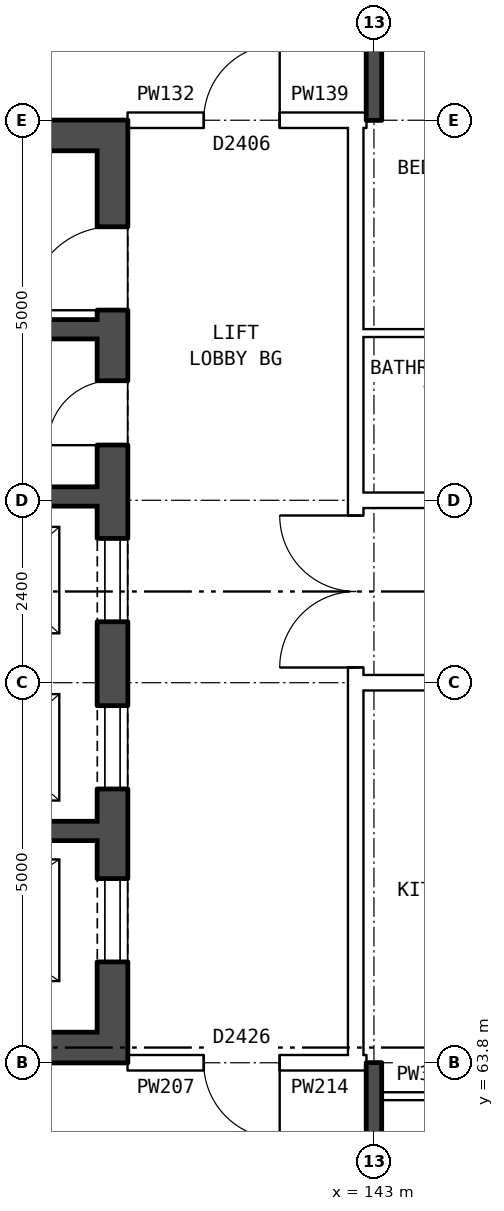
"""IFC4 building model, lengths in metres.
Left out: names, types, materials, properties, quantities, classifications, styles, units other than length and angle.
Written with IfcOpenShell. Run it as: python <this file> out.ifc"""

import sys

from ifc_helpers import new_model, si_unit, direction, frame, frame_2d, origin, place, context, subcontext, project, spatial, rectangle, extrude, element, fill, save


model = new_model("IFC4")
c1 = context("Model", 3, precision=1e-05, world=origin(), true_north=direction((0.0, 1.0)))
c2 = subcontext(c1, "Body", "Model", "MODEL_VIEW")
j1 = project(units=[si_unit("LENGTHUNIT", "METRE"), si_unit("PLANEANGLEUNIT", "RADIAN")], contexts=[c1])
p1 = place(None, origin())
s1 = spatial("IfcSite", under=j1, at=p1, CompositionType="ELEMENT")
p2 = place(p1, origin())
s2 = spatial("IfcBuilding", under=s1, at=p2, CompositionType="ELEMENT")
p3 = place(p2, frame((0.0, 0.0, 227.6)))
s3 = spatial("IfcBuildingStorey", under=s2, at=p3, CompositionType="ELEMENT", Elevation=227.6)
p4 = place(p3, frame((139.56, 63.8, 0.0), z_axis=(0.0, 0.0, 1.0), x_axis=(0.0, 1.0, 0.0)))
e1 = element("IfcWall", 1, at=p4, inside=s3, PredefinedType="SHEAR", context=c2, shape_type="SweptSolid", body=[
    extrude(rectangle(XDim=12.4, YDim=0.4, at=frame_2d((6.2, 0.0))), origin(), (0.0, 0.0, 1.0), 2.85),
])
p5 = place(p4, frame((1.325, 0.0, 0.0)))
e2 = element("IfcOpeningElement", 2, at=p5, cuts=e1, PredefinedType="OPENING", context=c2, shape_type="SweptSolid", body=[
    extrude(rectangle(XDim=1.1, YDim=2.1, at=frame_2d((0.55, 1.05))), frame((0.0, 0.21, 0.0), z_axis=(0.0, -1.0, 0.0), x_axis=(1.0, 0.0, 0.0)), (0.0, 0.0, 1.0), 0.42),
])
p6 = place(p4, frame((3.6, 0.0, 0.0)))
e3 = element("IfcOpeningElement", 3, at=p6, cuts=e1, PredefinedType="OPENING", context=c2, shape_type="SweptSolid", body=[
    extrude(rectangle(XDim=1.1, YDim=2.1, at=frame_2d((0.55, 1.05))), frame((0.0, 0.21, 0.0), z_axis=(0.0, -1.0, 0.0), x_axis=(1.0, 0.0, 0.0)), (0.0, 0.0, 1.0), 0.42),
])
p7 = place(p4, frame((5.8, 0.0, 0.0)))
e4 = element("IfcOpeningElement", 4, at=p7, cuts=e1, PredefinedType="OPENING", context=c2, shape_type="SweptSolid", body=[
    extrude(rectangle(XDim=1.1, YDim=2.1, at=frame_2d((0.55, 1.05))), frame((0.0, 0.21, 0.0), z_axis=(0.0, -1.0, 0.0), x_axis=(1.0, 0.0, 0.0)), (0.0, 0.0, 1.0), 0.42),
])
p8 = place(p4, frame((9.9, 0.0, 0.0)))
e5 = element("IfcOpeningElement", 5, at=p8, cuts=e1, PredefinedType="OPENING", context=c2, shape_type="SweptSolid", body=[
    extrude(rectangle(XDim=1.1, YDim=2.1, at=frame_2d((0.55, 1.05))), frame((0.0, 0.21, 0.0), z_axis=(0.0, -1.0, 0.0), x_axis=(1.0, 0.0, 0.0)), (0.0, 0.0, 1.0), 0.42),
])
p9 = place(p4, frame((8.125, 0.0, 0.0)))
e6 = element("IfcOpeningElement", 6, at=p9, cuts=e1, PredefinedType="OPENING", context=c2, shape_type="SweptSolid", body=[
    extrude(rectangle(XDim=0.85, YDim=2.1, at=frame_2d((0.425, 1.05))), frame((0.0, 0.21, 0.0), z_axis=(0.0, -1.0, 0.0), x_axis=(1.0, 0.0, 0.0)), (0.0, 0.0, 1.0), 0.42),
])
for number, where, z_axis, x_axis in (
    (7, (139.36, 64.0, 0.0), (0.0, 0.0, 1.0), (-1.0, 0.0, 0.0)),
    (8, (139.36, 76.0, 0.0), (0.0, 0.0, 1.0), (-1.0, 0.0, 0.0)),
):
    element("IfcWall", number, at=place(p3, frame(where, z_axis=z_axis, x_axis=x_axis)), inside=s3, PredefinedType="SHEAR", context=c2, shape_type="SweptSolid", body=[
        extrude(rectangle(XDim=7.6, YDim=0.4, at=frame_2d((3.8, 0.0))), origin(), (0.0, 0.0, 1.0), 2.85),
    ])
p10 = place(p3, frame((139.36, 66.85, 0.0), z_axis=(0.0, 0.0, 1.0), x_axis=(-1.0, 0.0, 0.0)))
e9 = element("IfcWall", 9, at=p10, inside=s3, PredefinedType="SHEAR", context=c2, shape_type="SweptSolid", body=[
    extrude(rectangle(XDim=4.775, YDim=0.25, at=frame_2d((2.388, 0.0))), origin(), (0.0, 0.0, 1.0), 2.85),
])
p11 = place(p3, frame((139.36, 71.25, 0.0), z_axis=(0.0, 0.0, 1.0), x_axis=(-1.0, 0.0, 0.0)))
e10 = element("IfcWall", 10, at=p11, inside=s3, PredefinedType="SHEAR", context=c2, shape_type="SweptSolid", body=[
    extrude(rectangle(XDim=7.6, YDim=0.25, at=frame_2d((3.8, 0.0))), origin(), (0.0, 0.0, 1.0), 2.85),
])
p12 = place(p11, frame((5.175, 0.0, 0.0)))
e11 = element("IfcOpeningElement", 11, at=p12, cuts=e10, PredefinedType="OPENING", context=c2, shape_type="SweptSolid", body=[
    extrude(rectangle(XDim=1.1, YDim=2.1, at=frame_2d((0.55, 1.05))), frame((0.0, 0.135, 0.0), z_axis=(0.0, -1.0, 0.0), x_axis=(1.0, 0.0, 0.0)), (0.0, 0.0, 1.0), 0.27),
])
p13 = place(p11, frame((3.35, 0.0, 0.0)))
e12 = element("IfcOpeningElement", 12, at=p13, cuts=e10, PredefinedType="OPENING", context=c2, shape_type="SweptSolid", body=[
    extrude(rectangle(XDim=0.85, YDim=2.1, at=frame_2d((0.425, 1.05))), frame((0.0, 0.135, 0.0), z_axis=(0.0, -1.0, 0.0), x_axis=(1.0, 0.0, 0.0)), (0.0, 0.0, 1.0), 0.27),
])
p14 = place(p3, frame((139.36, 73.45, 0.0), z_axis=(0.0, 0.0, 1.0), x_axis=(-1.0, 0.0, 0.0)))
e13 = element("IfcWall", 13, at=p14, inside=s3, PredefinedType="SHEAR", context=c2, shape_type="SweptSolid", body=[
    extrude(rectangle(XDim=2.525, YDim=0.25, at=frame_2d((1.263, 0.0))), origin(), (0.0, 0.0, 1.0), 2.85),
])
p15 = place(p3, frame((142.76, 63.9, 0.0), z_axis=(0.0, 0.0, 1.0), x_axis=(0.0, 1.0, 0.0)))
e14 = element("IfcWall", 14, at=p15, inside=s3, PredefinedType="PARTITIONING", context=c2, shape_type="SweptSolid", body=[
    extrude(rectangle(XDim=12.2, YDim=0.2, at=frame_2d((6.1, 0.0))), origin(), (0.0, 0.0, 1.0), 2.85),
])
p16 = place(p15, frame((5.1, 0.0, 0.0)))
e15 = element("IfcOpeningElement", 15, at=p16, cuts=e14, PredefinedType="OPENING", context=c2, shape_type="SweptSolid", body=[
    extrude(rectangle(XDim=2.0, YDim=2.1, at=frame_2d((1.0, 1.05))), frame((0.0, 0.11, 0.0), z_axis=(0.0, -1.0, 0.0), x_axis=(1.0, 0.0, 0.0)), (0.0, 0.0, 1.0), 0.22),
])
p17 = place(p3, frame((143.1, 63.36, 0.0), z_axis=(0.0, 0.0, 1.0), x_axis=(1.0, 0.0, 0.0)))
e16 = element("IfcWall", 16, at=p17, inside=s3, PredefinedType="PARTITIONING", context=c2, shape_type="SweptSolid", body=[
    extrude(rectangle(XDim=2.9, YDim=0.1, at=frame_2d((1.45, 0.0))), origin(), (0.0, 0.0, 1.0), 2.85),
])
p18 = place(p17, frame((1.0, 0.0, 0.0)))
e17 = element("IfcOpeningElement", 17, at=p18, cuts=e16, PredefinedType="OPENING", context=c2, shape_type="SweptSolid", body=[
    extrude(rectangle(XDim=0.9, YDim=2.1, at=frame_2d((0.45, 1.05))), frame((0.0, 0.06, 0.0), z_axis=(0.0, -1.0, 0.0), x_axis=(1.0, 0.0, 0.0)), (0.0, 0.0, 1.0), 0.12),
])
p19 = place(p3, frame((139.76, 63.8, 0.0), z_axis=(0.0, 0.0, 1.0), x_axis=(1.0, 0.0, 0.0)))
e18 = element("IfcWall", 18, at=p19, inside=s3, PredefinedType="PARTITIONING", context=c2, shape_type="SweptSolid", body=[
    extrude(rectangle(XDim=3.0, YDim=0.2, at=frame_2d((1.5, 0.0))), origin(), (0.0, 0.0, 1.0), 2.85),
])
p20 = place(p19, frame((1.0, 0.0, 0.0)))
e19 = element("IfcOpeningElement", 19, at=p20, cuts=e18, PredefinedType="OPENING", context=c2, shape_type="SweptSolid", body=[
    extrude(rectangle(XDim=1.0, YDim=2.1, at=frame_2d((0.5, 1.05))), frame((0.0, 0.11, 0.0), z_axis=(0.0, -1.0, 0.0), x_axis=(1.0, 0.0, 0.0)), (0.0, 0.0, 1.0), 0.22),
])
p21 = place(p3, frame((142.76, 63.8, 0.0), z_axis=(0.0, 0.0, 1.0), x_axis=(1.0, 0.0, 0.0)))
e20 = element("IfcWall", 20, at=p21, inside=s3, PredefinedType="PARTITIONING", context=c2, shape_type="SweptSolid", body=[
    extrude(rectangle(XDim=0.14, YDim=0.2, at=frame_2d((0.07, 0.0))), origin(), (0.0, 0.0, 1.0), 2.85),
])
p22 = place(p3, frame((142.76, 68.8, 0.0), z_axis=(0.0, 0.0, 1.0), x_axis=(1.0, 0.0, 0.0)))
e21 = element("IfcWall", 21, at=p22, inside=s3, PredefinedType="PARTITIONING", context=c2, shape_type="SweptSolid", body=[
    extrude(rectangle(XDim=14.48, YDim=0.2, at=frame_2d((7.24, 0.0))), origin(), (0.0, 0.0, 1.0), 2.85),
])
p23 = place(p22, frame((1.12, 0.0, 0.0)))
e22 = element("IfcOpeningElement", 22, at=p23, cuts=e21, PredefinedType="OPENING", context=c2, shape_type="SweptSolid", body=[
    extrude(rectangle(XDim=1.0, YDim=2.1, at=frame_2d((0.5, 1.05))), frame((0.0, 0.11, 0.0), z_axis=(0.0, -1.0, 0.0), x_axis=(1.0, 0.0, 0.0)), (0.0, 0.0, 1.0), 0.22),
])
p24 = place(p22, frame((10.24, 0.0, 0.0)))
e23 = element("IfcOpeningElement", 23, at=p24, cuts=e21, PredefinedType="OPENING", context=c2, shape_type="SweptSolid", body=[
    extrude(rectangle(XDim=1.0, YDim=2.1, at=frame_2d((0.5, 1.05))), frame((0.0, 0.11, 0.0), z_axis=(0.0, -1.0, 0.0), x_axis=(1.0, 0.0, 0.0)), (0.0, 0.0, 1.0), 0.22),
])
p25 = place(p3, frame((142.76, 71.2, 0.0), z_axis=(0.0, 0.0, 1.0), x_axis=(1.0, 0.0, 0.0)))
e24 = element("IfcWall", 24, at=p25, inside=s3, PredefinedType="PARTITIONING", context=c2, shape_type="SweptSolid", body=[
    extrude(rectangle(XDim=14.48, YDim=0.2, at=frame_2d((7.24, 0.0))), origin(), (0.0, 0.0, 1.0), 2.85),
])
p26 = place(p25, frame((4.24, 0.0, 0.0)))
e25 = element("IfcOpeningElement", 25, at=p26, cuts=e24, PredefinedType="OPENING", context=c2, shape_type="SweptSolid", body=[
    extrude(rectangle(XDim=1.0, YDim=2.1, at=frame_2d((0.5, 1.05))), frame((0.0, 0.11, 0.0), z_axis=(0.0, -1.0, 0.0), x_axis=(1.0, 0.0, 0.0)), (0.0, 0.0, 1.0), 0.22),
])
p27 = place(p25, frame((10.24, 0.0, 0.0)))
e26 = element("IfcOpeningElement", 26, at=p27, cuts=e24, PredefinedType="OPENING", context=c2, shape_type="SweptSolid", body=[
    extrude(rectangle(XDim=1.0, YDim=2.1, at=frame_2d((0.5, 1.05))), frame((0.0, 0.11, 0.0), z_axis=(0.0, -1.0, 0.0), x_axis=(1.0, 0.0, 0.0)), (0.0, 0.0, 1.0), 0.22),
])
p28 = place(p3, frame((142.76, 73.4, 0.0), z_axis=(0.0, 0.0, 1.0), x_axis=(1.0, 0.0, 0.0)))
e27 = element("IfcWall", 27, at=p28, inside=s3, PredefinedType="PARTITIONING", context=c2, shape_type="SweptSolid", body=[
    extrude(rectangle(XDim=3.24, YDim=0.1, at=frame_2d((1.62, 0.0))), origin(), (0.0, 0.0, 1.0), 2.85),
])
p29 = place(p3, frame((139.76, 76.2, 0.0), z_axis=(0.0, 0.0, 1.0), x_axis=(1.0, 0.0, 0.0)))
e28 = element("IfcWall", 28, at=p29, inside=s3, PredefinedType="PARTITIONING", context=c2, shape_type="SweptSolid", body=[
    extrude(rectangle(XDim=3.0, YDim=0.2, at=frame_2d((1.5, 0.0))), origin(), (0.0, 0.0, 1.0), 2.85),
])
p30 = place(p29, frame((1.0, 0.0, 0.0)))
e29 = element("IfcOpeningElement", 29, at=p30, cuts=e28, PredefinedType="OPENING", context=c2, shape_type="SweptSolid", body=[
    extrude(rectangle(XDim=1.0, YDim=2.1, at=frame_2d((0.5, 1.05))), frame((0.0, 0.11, 0.0), z_axis=(0.0, -1.0, 0.0), x_axis=(1.0, 0.0, 0.0)), (0.0, 0.0, 1.0), 0.22),
])
p31 = place(p3, frame((142.76, 76.2, 0.0), z_axis=(0.0, 0.0, 1.0), x_axis=(1.0, 0.0, 0.0)))
e30 = element("IfcWall", 30, at=p31, inside=s3, PredefinedType="PARTITIONING", context=c2, shape_type="SweptSolid", body=[
    extrude(rectangle(XDim=0.14, YDim=0.2, at=frame_2d((0.07, 0.0))), origin(), (0.0, 0.0, 1.0), 2.85),
])
for number, where, z_axis, x_axis in (
    (31, (143.0, 54.36, 0.0), (0.0, 0.0, 1.0), (0.0, 1.0, 0.0)),
    (32, (143.0, 76.2, 0.0), (0.0, 0.0, 1.0), (0.0, 1.0, 0.0)),
):
    element("IfcWall", number, at=place(p3, frame(where, z_axis=z_axis, x_axis=x_axis)), inside=s3, PredefinedType="SOLIDWALL", context=c2, shape_type="SweptSolid", body=[
        extrude(rectangle(XDim=9.44, YDim=0.2, at=frame_2d((4.72, 0.0))), origin(), (0.0, 0.0, 1.0), 2.85),
    ])
p32 = place(p5, origin())
e33 = element("IfcDoor", 33, at=p32, inside=s3, OperationType="DOUBLE_DOOR_SLIDING", PredefinedType="DOOR", context=c2, shape_type="SweptSolid", body=[
    extrude(rectangle(XDim=1.1, YDim=2.1, at=frame_2d((0.55, 1.05))), frame((0.0, 0.185, 0.0), z_axis=(0.0, -1.0, 0.0), x_axis=(1.0, 0.0, 0.0)), (0.0, 0.0, 1.0), 0.05),
])
fill(e2, e33)
p33 = place(p6, origin())
e34 = element("IfcDoor", 34, at=p33, inside=s3, OperationType="DOUBLE_DOOR_SLIDING", PredefinedType="DOOR", context=c2, shape_type="SweptSolid", body=[
    extrude(rectangle(XDim=1.1, YDim=2.1, at=frame_2d((0.55, 1.05))), frame((0.0, 0.185, 0.0), z_axis=(0.0, -1.0, 0.0), x_axis=(1.0, 0.0, 0.0)), (0.0, 0.0, 1.0), 0.05),
])
fill(e3, e34)
p34 = place(p7, origin())
e35 = element("IfcDoor", 35, at=p34, inside=s3, OperationType="DOUBLE_DOOR_SLIDING", PredefinedType="DOOR", context=c2, shape_type="SweptSolid", body=[
    extrude(rectangle(XDim=1.1, YDim=2.1, at=frame_2d((0.55, 1.05))), frame((0.0, 0.185, 0.0), z_axis=(0.0, -1.0, 0.0), x_axis=(1.0, 0.0, 0.0)), (0.0, 0.0, 1.0), 0.05),
])
fill(e4, e35)
p35 = place(p8, origin())
e36 = element("IfcDoor", 36, at=p35, inside=s3, OperationType="SINGLE_SWING_LEFT", PredefinedType="DOOR", context=c2, shape_type="SweptSolid", body=[
    extrude(rectangle(XDim=1.1, YDim=2.1, at=frame_2d((0.55, 1.05))), frame((0.0, 0.185, 0.0), z_axis=(0.0, -1.0, 0.0), x_axis=(1.0, 0.0, 0.0)), (0.0, 0.0, 1.0), 0.05),
])
fill(e5, e36)
p36 = place(p9, origin())
e37 = element("IfcDoor", 37, at=p36, inside=s3, OperationType="SINGLE_SWING_LEFT", PredefinedType="DOOR", context=c2, shape_type="SweptSolid", body=[
    extrude(rectangle(XDim=0.85, YDim=2.1, at=frame_2d((0.425, 1.05))), frame((0.0, 0.185, 0.0), z_axis=(0.0, -1.0, 0.0), x_axis=(1.0, 0.0, 0.0)), (0.0, 0.0, 1.0), 0.05),
])
fill(e6, e37)
p37 = place(p16, origin())
e38 = element("IfcDoor", 38, at=p37, inside=s3, OperationType="DOUBLE_DOOR_SINGLE_SWING", PredefinedType="DOOR", context=c2, shape_type="SweptSolid", body=[
    extrude(rectangle(XDim=2.0, YDim=2.1, at=frame_2d((1.0, 1.05))), frame((0.0, 0.025, 0.0), z_axis=(0.0, -1.0, 0.0), x_axis=(1.0, 0.0, 0.0)), (0.0, 0.0, 1.0), 0.05),
])
fill(e15, e38)
p38 = place(p20, frame((1.0, 0.0, 0.0), z_axis=(0.0, 0.0, 1.0), x_axis=(-1.0, 0.0, 0.0)))
e39 = element("IfcDoor", 39, at=p38, inside=s3, OperationType="SINGLE_SWING_LEFT", PredefinedType="DOOR", context=c2, shape_type="SweptSolid", body=[
    extrude(rectangle(XDim=1.0, YDim=2.1, at=frame_2d((0.5, 1.05))), frame((0.0, 0.025, 0.0), z_axis=(0.0, -1.0, 0.0), x_axis=(1.0, 0.0, 0.0)), (0.0, 0.0, 1.0), 0.05),
])
fill(e19, e39)
p39 = place(p30, origin())
e40 = element("IfcDoor", 40, at=p39, inside=s3, OperationType="SINGLE_SWING_RIGHT", PredefinedType="DOOR", context=c2, shape_type="SweptSolid", body=[
    extrude(rectangle(XDim=1.0, YDim=2.1, at=frame_2d((0.5, 1.05))), frame((0.0, 0.025, 0.0), z_axis=(0.0, -1.0, 0.0), x_axis=(1.0, 0.0, 0.0)), (0.0, 0.0, 1.0), 0.05),
])
fill(e29, e40)
save(model, sys.argv[1])
